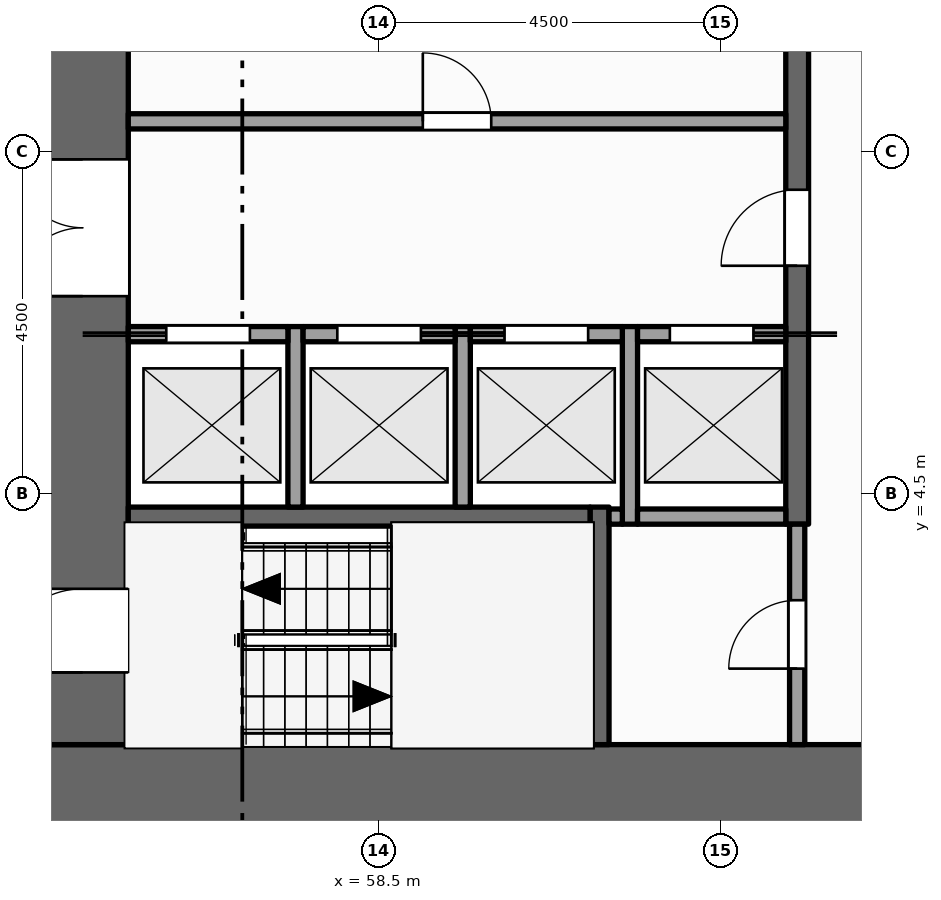
"""IFC4 building model, lengths in metres.
Left out: names, types, materials, properties, quantities, classifications, styles, units other than length and angle.
Written with IfcOpenShell. Run it as: python <this file> out.ifc"""

import sys

from ifc_helpers import new_model, si_unit, direction, frame, frame_2d, origin, place, context, subcontext, project, spatial, rectangle, extrude, element, fill, save


model = new_model("IFC4")
c1 = context("Model", 3, precision=1e-05, world=origin(), true_north=direction((0.0, 1.0)))
c2 = subcontext(c1, "Body", "Model", "MODEL_VIEW")
j1 = project(units=[si_unit("LENGTHUNIT", "METRE"), si_unit("PLANEANGLEUNIT", "RADIAN")], contexts=[c1])
p1 = place(None, origin())
s1 = spatial("IfcSite", under=j1, at=p1, CompositionType="ELEMENT")
p2 = place(p1, origin())
s2 = spatial("IfcBuilding", under=s1, at=p2, CompositionType="ELEMENT")
p3 = place(p2, frame((0.0, 0.0, 14.0)))
s3 = spatial("IfcBuildingStorey", under=s2, at=p3, CompositionType="ELEMENT", Elevation=14.0)
p4 = place(p3, frame((67.5, 0.6, -0.15), z_axis=(0.0, 0.0, 1.0), x_axis=(-1.0, 0.0, 0.0)))
e1 = element("IfcWall", 1, at=p4, inside=s3, PredefinedType="SHEAR", context=c2, shape_type="SweptSolid", body=[
    extrude(rectangle(XDim=13.5, YDim=1.2, at=frame_2d((6.75, 0.0))), origin(), (0.0, 0.0, 1.0), 5.0),
])
p5 = place(p3, frame((54.6, 1.2, -0.15), z_axis=(0.0, 0.0, 1.0), x_axis=(0.0, 1.0, 0.0)))
e2 = element("IfcWall", 2, at=p5, inside=s3, PredefinedType="SHEAR", context=c2, shape_type="SweptSolid", body=[
    extrude(rectangle(XDim=20.1, YDim=1.2, at=frame_2d((10.05, 0.0))), origin(), (0.0, 0.0, 1.0), 5.0),
])
p6 = place(p5, frame((5.9, 0.0, 0.15)))
e3 = element("IfcOpeningElement", 3, at=p6, cuts=e2, PredefinedType="OPENING", context=c2, shape_type="SweptSolid", body=[
    extrude(rectangle(XDim=1.8, YDim=2.1, at=frame_2d((0.9, 1.05))), frame((0.0, 0.61, 0.0), z_axis=(0.0, -1.0, 0.0), x_axis=(1.0, 0.0, 0.0)), (0.0, 0.0, 1.0), 1.22),
])
p7 = place(p5, frame((11.95, 0.0, 0.15)))
e4 = element("IfcOpeningElement", 4, at=p7, cuts=e2, PredefinedType="OPENING", context=c2, shape_type="SweptSolid", body=[
    extrude(rectangle(XDim=1.1, YDim=2.1, at=frame_2d((0.55, 1.05))), frame((0.0, 0.61, 0.0), z_axis=(0.0, -1.0, 0.0), x_axis=(1.0, 0.0, 0.0)), (0.0, 0.0, 1.0), 1.22),
])
p8 = place(p5, frame((0.95, 0.0, 0.15)))
e5 = element("IfcOpeningElement", 5, at=p8, cuts=e2, PredefinedType="OPENING", context=c2, shape_type="SweptSolid", body=[
    extrude(rectangle(XDim=1.1, YDim=2.1, at=frame_2d((0.55, 1.05))), frame((0.0, 0.61, 0.0), z_axis=(0.0, -1.0, 0.0), x_axis=(1.0, 0.0, 0.0)), (0.0, 0.0, 1.0), 1.22),
])
p9 = place(p5, frame((18.15, 0.0, 0.15)))
e6 = element("IfcOpeningElement", 6, at=p9, cuts=e2, PredefinedType="OPENING", context=c2, shape_type="SweptSolid", body=[
    extrude(rectangle(XDim=1.1, YDim=2.1, at=frame_2d((0.55, 1.05))), frame((0.0, 0.61, 0.0), z_axis=(0.0, -1.0, 0.0), x_axis=(1.0, 0.0, 0.0)), (0.0, 0.0, 1.0), 1.22),
])
for number, where, z_axis, x_axis in (
    (7, (57.4, 4.325, 0.0), (0.0, 0.0, 1.0), (0.0, 1.0, 0.0)),
    (8, (59.6, 4.325, 0.0), (0.0, 0.0, 1.0), (0.0, 1.0, 0.0)),
):
    element("IfcWall", number, at=place(p3, frame(where, z_axis=z_axis, x_axis=x_axis)), inside=s3, PredefinedType="SOLIDWALL", context=c2, shape_type="SweptSolid", body=[
        extrude(rectangle(XDim=2.375, YDim=0.2, at=frame_2d((1.188, 0.0))), origin(), (0.0, 0.0, 1.0), 4.75),
    ])
p10 = place(p3, frame((61.4, 1.2, 0.0), z_axis=(0.0, 0.0, 1.0), x_axis=(0.0, 1.0, 0.0)))
e9 = element("IfcWall", 9, at=p10, inside=s3, PredefinedType="SHEAR", context=c2, shape_type="SweptSolid", body=[
    extrude(rectangle(XDim=3.125, YDim=0.25, at=frame_2d((1.562, 0.0))), origin(), (0.0, 0.0, 1.0), 4.75),
])
p11 = place(p3, frame((61.8, 4.1, 0.0), z_axis=(0.0, 0.0, 1.0), x_axis=(0.0, 1.0, 0.0)))
e10 = element("IfcWall", 10, at=p11, inside=s3, PredefinedType="SOLIDWALL", context=c2, shape_type="SweptSolid", body=[
    extrude(rectangle(XDim=2.6, YDim=0.2, at=frame_2d((1.3, 0.0))), origin(), (0.0, 0.0, 1.0), 4.75),
])
p12 = place(p3, frame((64.0, 1.2, 0.0), z_axis=(0.0, 0.0, 1.0), x_axis=(0.0, 1.0, 0.0)))
e11 = element("IfcWall", 11, at=p12, inside=s3, PredefinedType="PARTITIONING", context=c2, shape_type="SweptSolid", body=[
    extrude(rectangle(XDim=2.9, YDim=0.2, at=frame_2d((1.45, 0.0))), origin(), (0.0, 0.0, 1.0), 4.75),
])
p13 = place(p12, frame((1.0, 0.0, 0.0)))
e12 = element("IfcOpeningElement", 12, at=p13, cuts=e11, PredefinedType="OPENING", context=c2, shape_type="SweptSolid", body=[
    extrude(rectangle(XDim=0.9, YDim=2.1, at=frame_2d((0.45, 1.05))), frame((0.0, 0.11, 0.0), z_axis=(0.0, -1.0, 0.0), x_axis=(1.0, 0.0, 0.0)), (0.0, 0.0, 1.0), 0.22),
])
p14 = place(p3, frame((64.0, 4.1, 0.0), z_axis=(0.0, 0.0, 1.0), x_axis=(0.0, 1.0, 0.0)))
e13 = element("IfcWall", 13, at=p14, inside=s3, PredefinedType="SHEAR", context=c2, shape_type="SweptSolid", body=[
    extrude(rectangle(XDim=14.5, YDim=0.3, at=frame_2d((7.25, 0.0))), origin(), (0.0, 0.0, 1.0), 4.75),
])
p15 = place(p14, frame((3.4, 0.0, 0.0)))
e14 = element("IfcOpeningElement", 14, at=p15, cuts=e13, PredefinedType="OPENING", context=c2, shape_type="SweptSolid", body=[
    extrude(rectangle(XDim=1.0, YDim=2.1, at=frame_2d((0.5, 1.05))), frame((0.0, 0.16, 0.0), z_axis=(0.0, -1.0, 0.0), x_axis=(1.0, 0.0, 0.0)), (0.0, 0.0, 1.0), 0.32),
])
p16 = place(p14, frame((9.1, 0.0, 0.0)))
e15 = element("IfcOpeningElement", 15, at=p16, cuts=e13, PredefinedType="OPENING", context=c2, shape_type="SweptSolid", body=[
    extrude(rectangle(XDim=1.0, YDim=2.1, at=frame_2d((0.5, 1.05))), frame((0.0, 0.16, 0.0), z_axis=(0.0, -1.0, 0.0), x_axis=(1.0, 0.0, 0.0)), (0.0, 0.0, 1.0), 0.32),
])
p17 = place(p3, frame((55.2, 4.2, 0.0), z_axis=(0.0, 0.0, 1.0), x_axis=(1.0, 0.0, 0.0)))
e16 = element("IfcWall", 16, at=p17, inside=s3, PredefinedType="SHEAR", context=c2, shape_type="SweptSolid", body=[
    extrude(rectangle(XDim=6.075, YDim=0.25, at=frame_2d((3.038, 0.0))), origin(), (0.0, 0.0, 1.0), 4.75),
])
p18 = place(p3, frame((61.525, 4.2, 0.0), z_axis=(0.0, 0.0, 1.0), x_axis=(1.0, 0.0, 0.0)))
e17 = element("IfcWall", 17, at=p18, inside=s3, PredefinedType="SOLIDWALL", context=c2, shape_type="SweptSolid", body=[
    extrude(rectangle(XDim=0.175, YDim=0.2, at=frame_2d((0.087, 0.0))), origin(), (0.0, 0.0, 1.0), 4.75),
])
p19 = place(p3, frame((61.9, 4.2, 0.0), z_axis=(0.0, 0.0, 1.0), x_axis=(1.0, 0.0, 0.0)))
e18 = element("IfcWall", 18, at=p19, inside=s3, PredefinedType="SOLIDWALL", context=c2, shape_type="SweptSolid", body=[
    extrude(rectangle(XDim=1.95, YDim=0.2, at=frame_2d((0.975, 0.0))), origin(), (0.0, 0.0, 1.0), 4.75),
])
p20 = place(p3, frame((55.2, 6.6, 0.0), z_axis=(0.0, 0.0, 1.0), x_axis=(1.0, 0.0, 0.0)))
e19 = element("IfcWall", 19, at=p20, inside=s3, PredefinedType="SOLIDWALL", context=c2, shape_type="SweptSolid", body=[
    extrude(rectangle(XDim=2.1, YDim=0.2, at=frame_2d((1.05, 0.0))), origin(), (0.0, 0.0, 1.0), 4.75),
])
p21 = place(p20, frame((0.5, 0.0, 0.012)))
e20 = element("IfcOpeningElement", 20, at=p21, cuts=e19, PredefinedType="OPENING", context=c2, shape_type="SweptSolid", body=[
    extrude(rectangle(XDim=1.1, YDim=2.1, at=frame_2d((0.55, 1.05))), frame((0.0, 0.11, 0.0), z_axis=(0.0, -1.0, 0.0), x_axis=(1.0, 0.0, 0.0)), (0.0, 0.0, 1.0), 0.22),
])
p22 = place(p3, frame((57.5, 6.6, 0.0), z_axis=(0.0, 0.0, 1.0), x_axis=(1.0, 0.0, 0.0)))
e21 = element("IfcWall", 21, at=p22, inside=s3, PredefinedType="SOLIDWALL", context=c2, shape_type="SweptSolid", body=[
    extrude(rectangle(XDim=2.0, YDim=0.2, at=frame_2d((1.0, 0.0))), origin(), (0.0, 0.0, 1.0), 4.75),
])
p23 = place(p22, frame((0.45, 0.0, 0.012)))
e22 = element("IfcOpeningElement", 22, at=p23, cuts=e21, PredefinedType="OPENING", context=c2, shape_type="SweptSolid", body=[
    extrude(rectangle(XDim=1.1, YDim=2.1, at=frame_2d((0.55, 1.05))), frame((0.0, 0.11, 0.0), z_axis=(0.0, -1.0, 0.0), x_axis=(1.0, 0.0, 0.0)), (0.0, 0.0, 1.0), 0.22),
])
p24 = place(p3, frame((59.7, 6.6, 0.0), z_axis=(0.0, 0.0, 1.0), x_axis=(1.0, 0.0, 0.0)))
e23 = element("IfcWall", 23, at=p24, inside=s3, PredefinedType="SOLIDWALL", context=c2, shape_type="SweptSolid", body=[
    extrude(rectangle(XDim=2.0, YDim=0.2, at=frame_2d((1.0, 0.0))), origin(), (0.0, 0.0, 1.0), 4.75),
])
p25 = place(p24, frame((0.45, 0.0, 0.012)))
e24 = element("IfcOpeningElement", 24, at=p25, cuts=e23, PredefinedType="OPENING", context=c2, shape_type="SweptSolid", body=[
    extrude(rectangle(XDim=1.1, YDim=2.1, at=frame_2d((0.55, 1.05))), frame((0.0, 0.11, 0.0), z_axis=(0.0, -1.0, 0.0), x_axis=(1.0, 0.0, 0.0)), (0.0, 0.0, 1.0), 0.22),
])
p26 = place(p3, frame((61.9, 6.6, 0.0), z_axis=(0.0, 0.0, 1.0), x_axis=(1.0, 0.0, 0.0)))
e25 = element("IfcWall", 25, at=p26, inside=s3, PredefinedType="SOLIDWALL", context=c2, shape_type="SweptSolid", body=[
    extrude(rectangle(XDim=1.95, YDim=0.2, at=frame_2d((0.975, 0.0))), origin(), (0.0, 0.0, 1.0), 4.75),
])
p27 = place(p26, frame((0.425, 0.0, 0.012)))
e26 = element("IfcOpeningElement", 26, at=p27, cuts=e25, PredefinedType="OPENING", context=c2, shape_type="SweptSolid", body=[
    extrude(rectangle(XDim=1.1, YDim=2.1, at=frame_2d((0.55, 1.05))), frame((0.0, 0.11, 0.0), z_axis=(0.0, -1.0, 0.0), x_axis=(1.0, 0.0, 0.0)), (0.0, 0.0, 1.0), 0.22),
])
p28 = place(p3, frame((55.2, 9.4, 0.0), z_axis=(0.0, 0.0, 1.0), x_axis=(1.0, 0.0, 0.0)))
e27 = element("IfcWall", 27, at=p28, inside=s3, PredefinedType="PARTITIONING", context=c2, shape_type="SweptSolid", body=[
    extrude(rectangle(XDim=8.65, YDim=0.2, at=frame_2d((4.325, 0.0))), origin(), (0.0, 0.0, 1.0), 4.75),
])
p29 = place(p28, frame((3.875, 0.0, 0.0)))
e28 = element("IfcOpeningElement", 28, at=p29, cuts=e27, PredefinedType="OPENING", context=c2, shape_type="SweptSolid", body=[
    extrude(rectangle(XDim=0.9, YDim=2.1, at=frame_2d((0.45, 1.05))), frame((0.0, 0.11, 0.0), z_axis=(0.0, -1.0, 0.0), x_axis=(1.0, 0.0, 0.0)), (0.0, 0.0, 1.0), 0.22),
])
p30 = place(p21, origin())
e29 = element("IfcDoor", 29, at=p30, inside=s3, OperationType="SLIDING_TO_LEFT", PredefinedType="DOOR", context=c2, shape_type="SweptSolid", body=[
    extrude(rectangle(XDim=1.1, YDim=2.1, at=frame_2d((0.55, 1.05))), frame((0.0, 0.025, 0.0), z_axis=(0.0, -1.0, 0.0), x_axis=(1.0, 0.0, 0.0)), (0.0, 0.0, 1.0), 0.05),
])
fill(e20, e29)
p31 = place(p23, origin())
e30 = element("IfcDoor", 30, at=p31, inside=s3, OperationType="SLIDING_TO_RIGHT", PredefinedType="DOOR", context=c2, shape_type="SweptSolid", body=[
    extrude(rectangle(XDim=1.1, YDim=2.1, at=frame_2d((0.55, 1.05))), frame((0.0, 0.025, 0.0), z_axis=(0.0, -1.0, 0.0), x_axis=(1.0, 0.0, 0.0)), (0.0, 0.0, 1.0), 0.05),
])
fill(e22, e30)
p32 = place(p25, origin())
e31 = element("IfcDoor", 31, at=p32, inside=s3, OperationType="SLIDING_TO_LEFT", PredefinedType="DOOR", context=c2, shape_type="SweptSolid", body=[
    extrude(rectangle(XDim=1.1, YDim=2.1, at=frame_2d((0.55, 1.05))), frame((0.0, 0.025, 0.0), z_axis=(0.0, -1.0, 0.0), x_axis=(1.0, 0.0, 0.0)), (0.0, 0.0, 1.0), 0.05),
])
fill(e24, e31)
p33 = place(p27, origin())
e32 = element("IfcDoor", 32, at=p33, inside=s3, OperationType="SLIDING_TO_RIGHT", PredefinedType="DOOR", context=c2, shape_type="SweptSolid", body=[
    extrude(rectangle(XDim=1.1, YDim=2.1, at=frame_2d((0.55, 1.05))), frame((0.0, 0.025, 0.0), z_axis=(0.0, -1.0, 0.0), x_axis=(1.0, 0.0, 0.0)), (0.0, 0.0, 1.0), 0.05),
])
fill(e26, e32)
p34 = place(p6, origin())
e33 = element("IfcDoor", 33, at=p34, inside=s3, OperationType="DOUBLE_DOOR_SINGLE_SWING", PredefinedType="DOOR", context=c2, shape_type="SweptSolid", body=[
    extrude(rectangle(XDim=1.8, YDim=2.1, at=frame_2d((0.9, 1.05))), frame((0.0, 0.025, 0.0), z_axis=(0.0, -1.0, 0.0), x_axis=(1.0, 0.0, 0.0)), (0.0, 0.0, 1.0), 0.05),
])
fill(e3, e33)
p35 = place(p15, origin())
e34 = element("IfcDoor", 34, at=p35, inside=s3, OperationType="SINGLE_SWING_LEFT", PredefinedType="DOOR", context=c2, shape_type="SweptSolid", body=[
    extrude(rectangle(XDim=1.0, YDim=2.1, at=frame_2d((0.5, 1.05))), frame((0.0, 0.025, 0.0), z_axis=(0.0, -1.0, 0.0), x_axis=(1.0, 0.0, 0.0)), (0.0, 0.0, 1.0), 0.05),
])
fill(e14, e34)
p36 = place(p8, origin())
e35 = element("IfcDoor", 35, at=p36, inside=s3, OperationType="SINGLE_SWING_LEFT", PredefinedType="DOOR", context=c2, shape_type="SweptSolid", body=[
    extrude(rectangle(XDim=1.1, YDim=2.1, at=frame_2d((0.55, 1.05))), frame((0.0, 0.025, 0.0), z_axis=(0.0, -1.0, 0.0), x_axis=(1.0, 0.0, 0.0)), (0.0, 0.0, 1.0), 0.05),
])
fill(e5, e35)
p37 = place(p13, origin())
e36 = element("IfcDoor", 36, at=p37, inside=s3, OperationType="SINGLE_SWING_LEFT", PredefinedType="DOOR", context=c2, shape_type="SweptSolid", body=[
    extrude(rectangle(XDim=0.9, YDim=2.1, at=frame_2d((0.45, 1.05))), frame((0.0, 0.025, 0.0), z_axis=(0.0, -1.0, 0.0), x_axis=(1.0, 0.0, 0.0)), (0.0, 0.0, 1.0), 0.05),
])
fill(e12, e36)
p38 = place(p29, origin())
e37 = element("IfcDoor", 37, at=p38, inside=s3, OperationType="SINGLE_SWING_LEFT", PredefinedType="DOOR", context=c2, shape_type="SweptSolid", body=[
    extrude(rectangle(XDim=0.9, YDim=2.1, at=frame_2d((0.45, 1.05))), frame((0.0, 0.025, 0.0), z_axis=(0.0, -1.0, 0.0), x_axis=(1.0, 0.0, 0.0)), (0.0, 0.0, 1.0), 0.05),
])
fill(e28, e37)
save(model, sys.argv[1])
